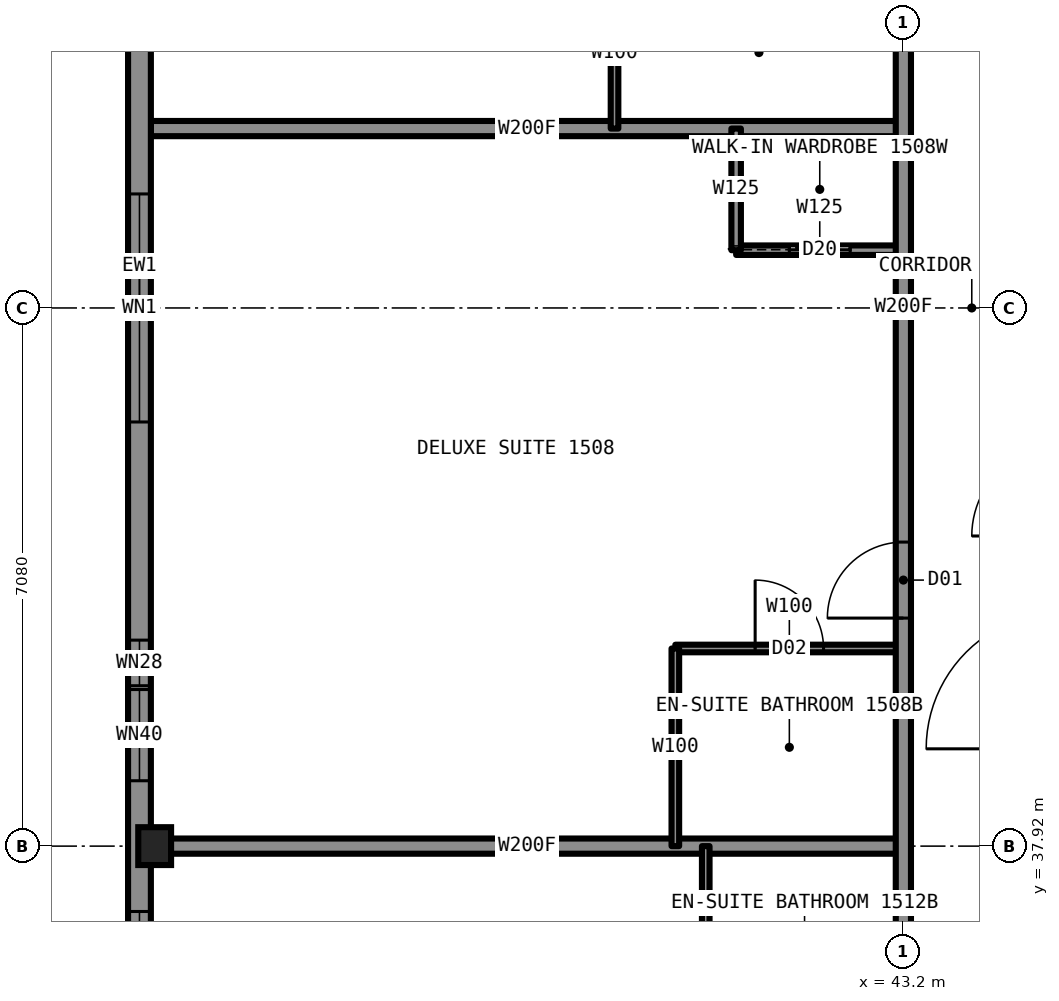
"""IFC4 building model, lengths in metres.
Left out: names, types, materials, properties, quantities, classifications, styles, units other than length and angle.
Written with IfcOpenShell. Run it as: python <this file> out.ifc"""

import sys

from ifc_helpers import new_model, si_unit, direction, frame, frame_2d, origin, origin_2d, place, context, subcontext, project, spatial, rectangle, i_section, extrude, element, fill, save


model = new_model("IFC4")
c1 = context("Model", 3, precision=1e-05, world=origin(), true_north=direction((0.0, 1.0)))
c2 = subcontext(c1, "Body", "Model", "MODEL_VIEW")
j1 = project(units=[si_unit("LENGTHUNIT", "METRE"), si_unit("PLANEANGLEUNIT", "RADIAN")], contexts=[c1])
p1 = place(None, origin())
s1 = spatial("IfcSite", under=j1, at=p1, CompositionType="ELEMENT")
p2 = place(p1, origin())
s2 = spatial("IfcBuilding", under=s1, at=p2, CompositionType="ELEMENT")
p3 = place(p2, frame((0.0, 0.0, 60.0)))
s3 = spatial("IfcBuildingStorey", under=s2, at=p3, CompositionType="ELEMENT", Elevation=60.0)
p4 = place(p3, frame((33.35, 37.92, 0.0), z_axis=(0.0, 0.0, 1.0), x_axis=(1.0, 0.0, 0.0)))
e1 = element("IfcColumn", 1, at=p4, inside=s3, PredefinedType="COLUMN", context=c2, shape_type="SweptSolid", body=[
    extrude(i_section(OverallWidth=0.432, OverallDepth=0.498, WebThickness=0.056, FlangeThickness=0.089, at=origin_2d()), origin(), (0.0, 0.0, 1.0), 3.5),
])
p5 = place(p3, frame((40.2, 40.52, 0.0), z_axis=(0.0, 0.0, 1.0), x_axis=(1.0, 0.0, 0.0)))
e2 = element("IfcWall", 2, at=p5, inside=s3, PredefinedType="PARTITIONING", context=c2, shape_type="SweptSolid", body=[
    extrude(rectangle(XDim=3.0, YDim=0.1, at=frame_2d((1.5, 0.0))), origin(), (0.0, 0.0, 1.0), 3.33),
])
p6 = place(p5, frame((1.05, 0.0, 0.0)))
e3 = element("IfcOpeningElement", 3, at=p6, cuts=e2, PredefinedType="OPENING", context=c2, shape_type="SweptSolid", body=[
    extrude(rectangle(XDim=0.9, YDim=2.1, at=frame_2d((0.45, 1.05))), frame((0.0, 0.06, 0.0), z_axis=(0.0, -1.0, 0.0), x_axis=(1.0, 0.0, 0.0)), (0.0, 0.0, 1.0), 0.12),
])
p7 = place(p3, frame((33.3, 37.92, 0.0), z_axis=(0.0, 0.0, 1.0), x_axis=(1.0, 0.0, 0.0)))
e4 = element("IfcWall", 4, at=p7, inside=s3, PredefinedType="PARTITIONING", context=c2, shape_type="SweptSolid", body=[
    extrude(rectangle(XDim=9.9, YDim=0.2, at=frame_2d((4.95, 0.0))), origin(), (0.0, 0.0, 1.0), 2.573),
])
p8 = place(p3, frame((41.0, 45.76, 0.0), z_axis=(0.0, 0.0, 1.0), x_axis=(1.0, 0.0, 0.0)))
e5 = element("IfcWall", 5, at=p8, inside=s3, PredefinedType="PARTITIONING", context=c2, shape_type="SweptSolid", body=[
    extrude(rectangle(XDim=2.2, YDim=0.125, at=frame_2d((1.1, 0.0))), origin(), (0.0, 0.0, 1.0), 3.33),
])
p9 = place(p8, frame((0.7, 0.0, 0.0)))
e6 = element("IfcOpeningElement", 6, at=p9, cuts=e5, PredefinedType="OPENING", context=c2, shape_type="SweptSolid", body=[
    extrude(rectangle(XDim=0.8, YDim=2.1, at=frame_2d((0.4, 1.05))), frame((0.0, 0.073, 0.0), z_axis=(0.0, -1.0, 0.0), x_axis=(1.0, 0.0, 0.0)), (0.0, 0.0, 1.0), 0.145),
])
p10 = place(p3, frame((33.3, 47.36, 0.0), z_axis=(0.0, 0.0, 1.0), x_axis=(1.0, 0.0, 0.0)))
e7 = element("IfcWall", 7, at=p10, inside=s3, PredefinedType="PARTITIONING", context=c2, shape_type="SweptSolid", body=[
    extrude(rectangle(XDim=9.9, YDim=0.2, at=frame_2d((4.95, 0.0))), origin(), (0.0, 0.0, 1.0), 2.723),
])
p11 = place(p3, frame((43.2, 33.22, 0.0), z_axis=(0.0, 0.0, 1.0), x_axis=(0.0, 1.0, 0.0)))
e8 = element("IfcWall", 8, at=p11, inside=s3, PredefinedType="PARTITIONING", context=c2, shape_type="SweptSolid", body=[
    extrude(rectangle(XDim=23.58, YDim=0.2, at=frame_2d((11.79, 0.0))), origin(), (0.0, 0.0, 1.0), 3.33),
])
p12 = place(p11, frame((7.7, 0.0, 0.0)))
e9 = element("IfcOpeningElement", 9, at=p12, cuts=e8, PredefinedType="OPENING", context=c2, shape_type="SweptSolid", body=[
    extrude(rectangle(XDim=1.0, YDim=2.2, at=frame_2d((0.5, 1.1))), frame((0.0, 0.11, 0.0), z_axis=(0.0, -1.0, 0.0), x_axis=(1.0, 0.0, 0.0)), (0.0, 0.0, 1.0), 0.22),
])
p13 = place(p11, frame((16.4, 0.0, 0.0)))
e10 = element("IfcOpeningElement", 10, at=p13, cuts=e8, PredefinedType="OPENING", context=c2, shape_type="SweptSolid", body=[
    extrude(rectangle(XDim=1.0, YDim=2.2, at=frame_2d((0.5, 1.1))), frame((0.0, 0.11, 0.0), z_axis=(0.0, -1.0, 0.0), x_axis=(1.0, 0.0, 0.0)), (0.0, 0.0, 1.0), 0.22),
])
p14 = place(p11, frame((21.82, 0.0, 0.0)))
e11 = element("IfcOpeningElement", 11, at=p14, cuts=e8, PredefinedType="OPENING", context=c2, shape_type="SweptSolid", body=[
    extrude(rectangle(XDim=1.1, YDim=2.2, at=frame_2d((0.55, 1.1))), frame((0.0, 0.11, 0.0), z_axis=(0.0, -1.0, 0.0), x_axis=(1.0, 0.0, 0.0)), (0.0, 0.0, 1.0), 0.22),
])
p15 = place(p11, frame((0.64, 0.0, 0.0)))
e12 = element("IfcOpeningElement", 12, at=p15, cuts=e8, PredefinedType="OPENING", context=c2, shape_type="SweptSolid", body=[
    extrude(rectangle(XDim=1.1, YDim=2.2, at=frame_2d((0.55, 1.1))), frame((0.0, 0.11, 0.0), z_axis=(0.0, -1.0, 0.0), x_axis=(1.0, 0.0, 0.0)), (0.0, 0.0, 1.0), 0.22),
])
p16 = place(p3, frame((41.0, 45.76, 0.0), z_axis=(0.0, 0.0, 1.0), x_axis=(0.0, 1.0, 0.0)))
e13 = element("IfcWall", 13, at=p16, inside=s3, PredefinedType="PARTITIONING", context=c2, shape_type="SweptSolid", body=[
    extrude(rectangle(XDim=1.6, YDim=0.125, at=frame_2d((0.8, 0.0))), origin(), (0.0, 0.0, 1.0), 3.33),
])
p17 = place(p3, frame((40.6, 35.32, 0.0), z_axis=(0.0, 0.0, 1.0), x_axis=(0.0, 1.0, 0.0)))
e14 = element("IfcWall", 14, at=p17, inside=s3, PredefinedType="PARTITIONING", context=c2, shape_type="SweptSolid", body=[
    extrude(rectangle(XDim=2.6, YDim=0.1, at=frame_2d((1.3, 0.0))), origin(), (0.0, 0.0, 1.0), 3.33),
])
p18 = place(p3, frame((40.2, 37.92, 0.0), z_axis=(0.0, 0.0, 1.0), x_axis=(0.0, 1.0, 0.0)))
e15 = element("IfcWall", 15, at=p18, inside=s3, PredefinedType="PARTITIONING", context=c2, shape_type="SweptSolid", body=[
    extrude(rectangle(XDim=2.6, YDim=0.1, at=frame_2d((1.3, 0.0))), origin(), (0.0, 0.0, 1.0), 3.33),
])
p19 = place(p3, frame((39.4, 47.36, 0.0), z_axis=(0.0, 0.0, 1.0), x_axis=(0.0, 1.0, 0.0)))
e16 = element("IfcWall", 16, at=p19, inside=s3, PredefinedType="PARTITIONING", context=c2, shape_type="SweptSolid", body=[
    extrude(rectangle(XDim=2.0, YDim=0.1, at=frame_2d((1.0, 0.0))), origin(), (0.0, 0.0, 1.0), 3.33),
])
p20 = place(p3, frame((33.15, 61.5, 0.0), z_axis=(0.0, 0.0, 1.0), x_axis=(0.0, -1.0, 0.0)))
e17 = element("IfcWall", 17, at=p20, inside=s3, PredefinedType="SOLIDWALL", context=c2, shape_type="SweptSolid", body=[
    extrude(rectangle(XDim=33.0, YDim=0.3, at=frame_2d((16.5, 0.0))), origin(), (0.0, 0.0, 1.0), 2.83),
])
p21 = place(p20, frame((0.85, 0.0, 0.5)))
e18 = element("IfcOpeningElement", 18, at=p21, cuts=e17, PredefinedType="OPENING", context=c2, shape_type="SweptSolid", body=[
    extrude(rectangle(XDim=3.0, YDim=2.0, at=frame_2d((1.5, 1.0))), frame((0.0, 0.16, 0.0), z_axis=(0.0, -1.0, 0.0), x_axis=(1.0, 0.0, 0.0)), (0.0, 0.0, 1.0), 0.32),
])
p22 = place(p20, frame((5.56, 0.0, 0.5)))
e19 = element("IfcOpeningElement", 19, at=p22, cuts=e17, PredefinedType="OPENING", context=c2, shape_type="SweptSolid", body=[
    extrude(rectangle(XDim=3.0, YDim=2.0, at=frame_2d((1.5, 1.0))), frame((0.0, 0.16, 0.0), z_axis=(0.0, -1.0, 0.0), x_axis=(1.0, 0.0, 0.0)), (0.0, 0.0, 1.0), 0.32),
])
p23 = place(p20, frame((10.28, 0.0, 0.5)))
e20 = element("IfcOpeningElement", 20, at=p23, cuts=e17, PredefinedType="OPENING", context=c2, shape_type="SweptSolid", body=[
    extrude(rectangle(XDim=1.2, YDim=1.7, at=frame_2d((0.6, 0.85))), frame((0.0, 0.16, 0.0), z_axis=(0.0, -1.0, 0.0), x_axis=(1.0, 0.0, 0.0)), (0.0, 0.0, 1.0), 0.32),
])
p24 = place(p20, frame((15.0, 0.0, 0.5)))
e21 = element("IfcOpeningElement", 21, at=p24, cuts=e17, PredefinedType="OPENING", context=c2, shape_type="SweptSolid", body=[
    extrude(rectangle(XDim=3.0, YDim=2.0, at=frame_2d((1.5, 1.0))), frame((0.0, 0.16, 0.0), z_axis=(0.0, -1.0, 0.0), x_axis=(1.0, 0.0, 0.0)), (0.0, 0.0, 1.0), 0.32),
])
p25 = place(p20, frame((21.52, 0.0, 0.5)))
e22 = element("IfcOpeningElement", 22, at=p25, cuts=e17, PredefinedType="OPENING", context=c2, shape_type="SweptSolid", body=[
    extrude(rectangle(XDim=1.2, YDim=1.7, at=frame_2d((0.6, 0.85))), frame((0.0, 0.16, 0.0), z_axis=(0.0, -1.0, 0.0), x_axis=(1.0, 0.0, 0.0)), (0.0, 0.0, 1.0), 0.32),
])
p26 = place(p20, frame((24.44, 0.0, 0.5)))
e23 = element("IfcOpeningElement", 23, at=p26, cuts=e17, PredefinedType="OPENING", context=c2, shape_type="SweptSolid", body=[
    extrude(rectangle(XDim=3.0, YDim=2.0, at=frame_2d((1.5, 1.0))), frame((0.0, 0.16, 0.0), z_axis=(0.0, -1.0, 0.0), x_axis=(1.0, 0.0, 0.0)), (0.0, 0.0, 1.0), 0.32),
])
p27 = place(p20, frame((29.15, 0.0, 0.5)))
e24 = element("IfcOpeningElement", 24, at=p27, cuts=e17, PredefinedType="OPENING", context=c2, shape_type="SweptSolid", body=[
    extrude(rectangle(XDim=3.0, YDim=2.0, at=frame_2d((1.5, 1.0))), frame((0.0, 0.16, 0.0), z_axis=(0.0, -1.0, 0.0), x_axis=(1.0, 0.0, 0.0)), (0.0, 0.0, 1.0), 0.32),
])
p28 = place(p20, frame((11.48, 0.0, 0.5)))
e25 = element("IfcOpeningElement", 25, at=p28, cuts=e17, PredefinedType="OPENING", context=c2, shape_type="SweptSolid", body=[
    extrude(rectangle(XDim=0.6, YDim=0.8, at=frame_2d((0.3, 0.4))), frame((0.0, 0.16, 0.0), z_axis=(0.0, -1.0, 0.0), x_axis=(1.0, 0.0, 0.0)), (0.0, 0.0, 1.0), 0.32),
])
p29 = place(p20, frame((20.87, 0.0, 0.5)))
e26 = element("IfcOpeningElement", 26, at=p29, cuts=e17, PredefinedType="OPENING", context=c2, shape_type="SweptSolid", body=[
    extrude(rectangle(XDim=0.6, YDim=0.8, at=frame_2d((0.3, 0.4))), frame((0.0, 0.16, 0.0), z_axis=(0.0, -1.0, 0.0), x_axis=(1.0, 0.0, 0.0)), (0.0, 0.0, 1.0), 0.32),
])
p30 = place(p12, origin())
e27 = element("IfcDoor", 27, at=p30, inside=s3, OperationType="SINGLE_SWING_LEFT", PredefinedType="DOOR", context=c2, shape_type="SweptSolid", body=[
    extrude(rectangle(XDim=1.0, YDim=2.2, at=frame_2d((0.5, 1.1))), frame((0.0, 0.025, 0.0), z_axis=(0.0, -1.0, 0.0), x_axis=(1.0, 0.0, 0.0)), (0.0, 0.0, 1.0), 0.05),
])
fill(e9, e27)
p31 = place(p6, origin())
e28 = element("IfcDoor", 28, at=p31, inside=s3, OperationType="SINGLE_SWING_RIGHT", PredefinedType="DOOR", context=c2, shape_type="SweptSolid", body=[
    extrude(rectangle(XDim=0.9, YDim=2.1, at=frame_2d((0.45, 1.05))), frame((0.0, 0.025, 0.0), z_axis=(0.0, -1.0, 0.0), x_axis=(1.0, 0.0, 0.0)), (0.0, 0.0, 1.0), 0.05),
])
fill(e3, e28)
p32 = place(p9, origin())
e29 = element("IfcDoor", 29, at=p32, inside=s3, OperationType="SLIDING_TO_LEFT", PredefinedType="DOOR", context=c2, shape_type="SweptSolid", body=[
    extrude(rectangle(XDim=0.8, YDim=2.1, at=frame_2d((0.4, 1.05))), frame((0.0, 0.025, 0.0), z_axis=(0.0, -1.0, 0.0), x_axis=(1.0, 0.0, 0.0)), (0.0, 0.0, 1.0), 0.05),
])
fill(e6, e29)
p33 = place(p24, origin())
e30 = element("IfcWindow", 30, at=p33, inside=s3, PartitioningType="SINGLE_PANEL", PredefinedType="WINDOW", context=c2, shape_type="SweptSolid", body=[
    extrude(rectangle(XDim=3.0, YDim=2.0, at=frame_2d((1.5, 1.0))), frame((0.0, 0.03, 0.0), z_axis=(0.0, -1.0, 0.0), x_axis=(1.0, 0.0, 0.0)), (0.0, 0.0, 1.0), 0.06),
])
fill(e21, e30)
p34 = place(p25, origin())
e31 = element("IfcWindow", 31, at=p34, inside=s3, PartitioningType="SINGLE_PANEL", PredefinedType="WINDOW", context=c2, shape_type="SweptSolid", body=[
    extrude(rectangle(XDim=1.2, YDim=1.7, at=frame_2d((0.6, 0.85))), frame((0.0, 0.03, 0.0), z_axis=(0.0, -1.0, 0.0), x_axis=(1.0, 0.0, 0.0)), (0.0, 0.0, 1.0), 0.06),
])
fill(e22, e31)
p35 = place(p26, origin())
e32 = element("IfcWindow", 32, at=p35, inside=s3, PartitioningType="SINGLE_PANEL", PredefinedType="WINDOW", context=c2, shape_type="SweptSolid", body=[
    extrude(rectangle(XDim=3.0, YDim=2.0, at=frame_2d((1.5, 1.0))), frame((0.0, 0.03, 0.0), z_axis=(0.0, -1.0, 0.0), x_axis=(1.0, 0.0, 0.0)), (0.0, 0.0, 1.0), 0.06),
])
fill(e23, e32)
p36 = place(p29, origin())
e33 = element("IfcWindow", 33, at=p36, inside=s3, PartitioningType="SINGLE_PANEL", PredefinedType="WINDOW", context=c2, shape_type="SweptSolid", body=[
    extrude(rectangle(XDim=0.6, YDim=0.8, at=frame_2d((0.3, 0.4))), frame((0.0, 0.03, 0.0), z_axis=(0.0, -1.0, 0.0), x_axis=(1.0, 0.0, 0.0)), (0.0, 0.0, 1.0), 0.06),
])
fill(e26, e33)
save(model, sys.argv[1])
